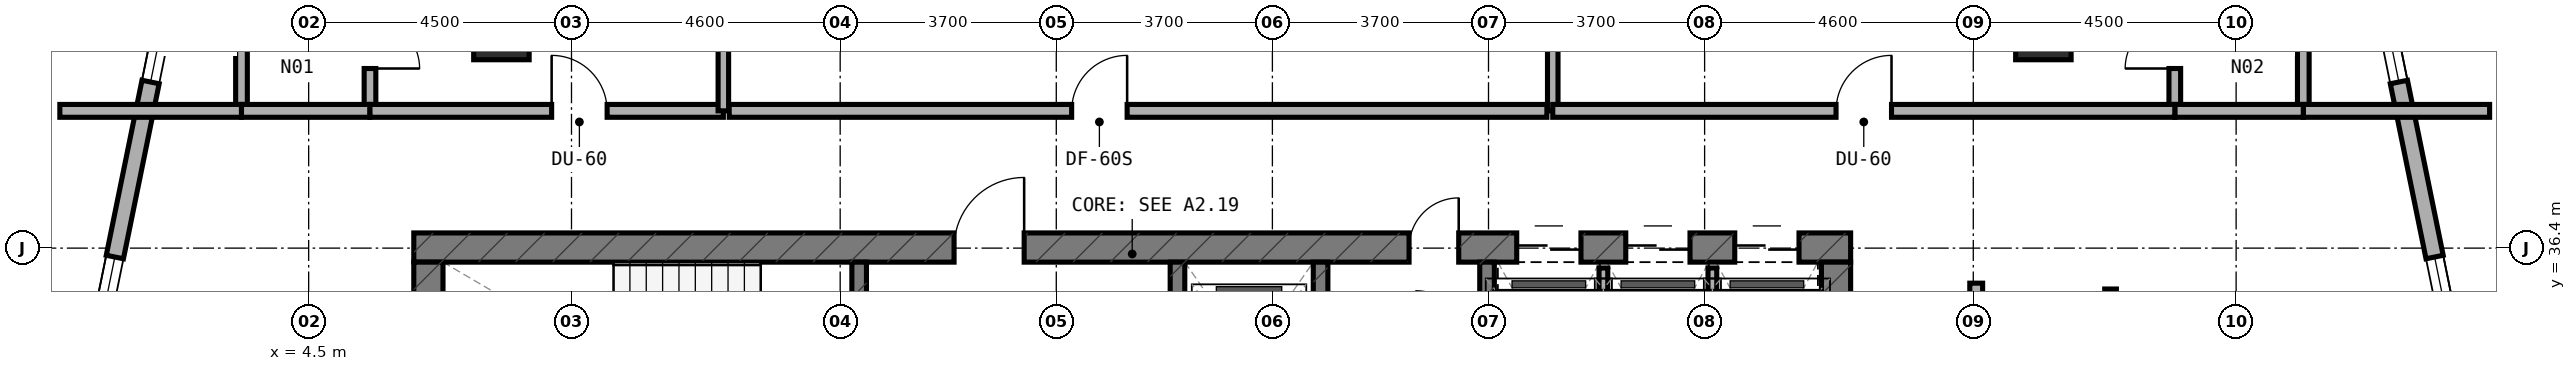
"""IFC4 building model, lengths in metres.
Left out: names, types, materials, properties, quantities, classifications, styles, units other than length and angle.
Written with IfcOpenShell. Run it as: python <this file> out.ifc"""

import sys

from ifc_helpers import new_model, si_unit, direction, frame, frame_2d, origin, origin_2d, place, context, subcontext, project, spatial, rectangle, extrude, element, fill, save


model = new_model("IFC4")
c1 = context("Model", 3, precision=1e-05, world=origin(), true_north=direction((0.0, 1.0)))
c2 = subcontext(c1, "Body", "Model", "MODEL_VIEW")
j1 = project(units=[si_unit("LENGTHUNIT", "METRE"), si_unit("PLANEANGLEUNIT", "RADIAN")], contexts=[c1])
p1 = place(None, origin())
s1 = spatial("IfcSite", under=j1, at=p1, CompositionType="ELEMENT")
p2 = place(p1, origin())
s2 = spatial("IfcBuilding", under=s1, at=p2, CompositionType="ELEMENT")
p3 = place(p2, frame((0.0, 0.0, 80.0)))
s3 = spatial("IfcBuildingStorey", under=s2, at=p3, CompositionType="ELEMENT", Elevation=80.0)
p4 = place(p3, frame((6.3, 36.41, 0.0), z_axis=(0.0, 0.0, 1.0), x_axis=(1.0, 0.0, 0.0)))
e1 = element("IfcWall", 1, at=p4, inside=s3, PredefinedType="SHEAR", context=c2, shape_type="SweptSolid", body=[
    extrude(rectangle(XDim=24.6, YDim=0.5, at=frame_2d((12.3, 0.0))), origin(), (0.0, 0.0, 1.0), 3.5),
])
p5 = place(p4, frame((9.25, 0.0, 0.0)))
e2 = element("IfcOpeningElement", 2, at=p5, cuts=e1, PredefinedType="OPENING", context=c2, shape_type="SweptSolid", body=[
    extrude(rectangle(XDim=1.2, YDim=2.15, at=frame_2d((0.6, 1.075))), frame((0.0, 0.26, 0.0), z_axis=(0.0, -1.0, 0.0), x_axis=(1.0, 0.0, 0.0)), (0.0, 0.0, 1.0), 0.52),
])
p6 = place(p4, frame((17.04, 0.0, 0.0)))
e3 = element("IfcOpeningElement", 3, at=p6, cuts=e1, PredefinedType="OPENING", context=c2, shape_type="SweptSolid", body=[
    extrude(rectangle(XDim=0.85, YDim=2.1, at=frame_2d((0.425, 1.05))), frame((0.0, 0.26, 0.0), z_axis=(0.0, -1.0, 0.0), x_axis=(1.0, 0.0, 0.0)), (0.0, 0.0, 1.0), 0.52),
])
p7 = place(p4, frame((18.883, 0.0, 0.0)))
e4 = element("IfcOpeningElement", 4, at=p7, cuts=e1, PredefinedType="OPENING", context=c2, shape_type="SweptSolid", body=[
    extrude(rectangle(XDim=1.1, YDim=2.15, at=frame_2d((0.55, 1.075))), frame((0.0, 0.26, 0.0), z_axis=(0.0, -1.0, 0.0), x_axis=(1.0, 0.0, 0.0)), (0.0, 0.0, 1.0), 0.52),
])
p8 = place(p4, frame((20.75, 0.0, 0.0)))
e5 = element("IfcOpeningElement", 5, at=p8, cuts=e1, PredefinedType="OPENING", context=c2, shape_type="SweptSolid", body=[
    extrude(rectangle(XDim=1.1, YDim=2.15, at=frame_2d((0.55, 1.075))), frame((0.0, 0.26, 0.0), z_axis=(0.0, -1.0, 0.0), x_axis=(1.0, 0.0, 0.0)), (0.0, 0.0, 1.0), 0.52),
])
p9 = place(p4, frame((22.616, 0.0, 0.0)))
e6 = element("IfcOpeningElement", 6, at=p9, cuts=e1, PredefinedType="OPENING", context=c2, shape_type="SweptSolid", body=[
    extrude(rectangle(XDim=1.1, YDim=2.15, at=frame_2d((0.55, 1.075))), frame((0.0, 0.26, 0.0), z_axis=(0.0, -1.0, 0.0), x_axis=(1.0, 0.0, 0.0)), (0.0, 0.0, 1.0), 0.52),
])
for number, where, z_axis, x_axis in (
    (7, (6.55, 33.0, 0.0), (0.0, 0.0, 1.0), (0.0, 1.0, 0.0)),
    (8, (30.65, 33.0, 0.0), (0.0, 0.0, 1.0), (0.0, 1.0, 0.0)),
):
    element("IfcWall", number, at=place(p3, frame(where, z_axis=z_axis, x_axis=x_axis)), inside=s3, PredefinedType="SHEAR", context=c2, shape_type="SweptSolid", body=[
        extrude(rectangle(XDim=3.16, YDim=0.5, at=frame_2d((1.58, 0.0))), origin(), (0.0, 0.0, 1.0), 3.5),
    ])
p10 = place(p3, frame((13.925, 33.0, 0.0), z_axis=(0.0, 0.0, 1.0), x_axis=(0.0, 1.0, 0.0)))
e9 = element("IfcWall", 9, at=p10, inside=s3, PredefinedType="STANDARD", context=c2, shape_type="SweptSolid", body=[
    extrude(rectangle(XDim=3.16, YDim=0.25, at=frame_2d((1.58, 0.0))), origin(), (0.0, 0.0, 1.0), 3.22),
])
p11 = place(p10, frame((0.98, 0.0, 0.0)))
e10 = element("IfcOpeningElement", 10, at=p11, cuts=e9, PredefinedType="OPENING", context=c2, shape_type="SweptSolid", body=[
    extrude(rectangle(XDim=1.1, YDim=2.15, at=frame_2d((0.55, 1.075))), frame((0.0, 0.135, 0.0), z_axis=(0.0, -1.0, 0.0), x_axis=(1.0, 0.0, 0.0)), (0.0, 0.0, 1.0), 0.27),
])
p12 = place(p3, frame((19.375, 33.0, 0.0), z_axis=(0.0, 0.0, 1.0), x_axis=(0.0, 1.0, 0.0)))
e11 = element("IfcWall", 11, at=p12, inside=s3, PredefinedType="STANDARD", context=c2, shape_type="SweptSolid", body=[
    extrude(rectangle(XDim=3.16, YDim=0.25, at=frame_2d((1.58, 0.0))), origin(), (0.0, 0.0, 1.0), 3.22),
])
p13 = place(p12, frame((0.98, 0.0, 0.0)))
e12 = element("IfcOpeningElement", 12, at=p13, cuts=e11, PredefinedType="OPENING", context=c2, shape_type="SweptSolid", body=[
    extrude(rectangle(XDim=1.1, YDim=2.15, at=frame_2d((0.55, 1.075))), frame((0.0, 0.135, 0.0), z_axis=(0.0, -1.0, 0.0), x_axis=(1.0, 0.0, 0.0)), (0.0, 0.0, 1.0), 0.27),
])
for number, where, z_axis, x_axis in (
    (13, (21.825, 33.0, 0.0), (0.0, 0.0, 1.0), (0.0, 1.0, 0.0)),
    (14, (24.675, 33.0, 0.0), (0.0, 0.0, 1.0), (0.0, 1.0, 0.0)),
):
    element("IfcWall", number, at=place(p3, frame(where, z_axis=z_axis, x_axis=x_axis)), inside=s3, PredefinedType="STANDARD", context=c2, shape_type="SweptSolid", body=[
        extrude(rectangle(XDim=3.16, YDim=0.25, at=frame_2d((1.58, 0.0))), origin(), (0.0, 0.0, 1.0), 3.22),
    ])
for number, where, z_axis, x_axis in (
    (15, (34.2, 40.2, 0.0), (0.0, 0.0, 1.0), (1.0, 0.0, 0.0)),
    (16, (7.8, 40.2, 0.0), (0.0, 0.0, 1.0), (1.0, 0.0, 0.0)),
):
    element("IfcColumn", number, at=place(p3, frame(where, z_axis=z_axis, x_axis=x_axis)), inside=s3, PredefinedType="COLUMN", context=c2, shape_type="SweptSolid", body=[
        extrude(rectangle(XDim=0.95, YDim=1.15, at=origin_2d()), origin(), (0.0, 0.0, 1.0), 3.5),
    ])
p14 = place(p3, frame((41.864, 31.516, 0.0), z_axis=(0.0, 0.0, 1.0), x_axis=(-0.199990901713, 0.979797754249, 0.0)))
e17 = element("IfcWall", 17, at=p14, inside=s3, PredefinedType="STANDARD", context=c2, shape_type="SweptSolid", body=[
    extrude(rectangle(XDim=10.065, YDim=0.3, at=frame_2d((5.033, 0.0))), origin(), (0.0, 0.0, 1.0), 3.22),
])
p15 = place(p14, frame((2.429, 0.0, 0.8)))
e18 = element("IfcOpeningElement", 18, at=p15, cuts=e17, PredefinedType="OPENING", context=c2, shape_type="SweptSolid", body=[
    extrude(rectangle(XDim=2.4, YDim=1.6, at=frame_2d((1.2, 0.8))), frame((0.0, 0.16, 0.0), z_axis=(0.0, -1.0, 0.0), x_axis=(1.0, 0.0, 0.0)), (0.0, 0.0, 1.0), 0.32),
])
p16 = place(p14, frame((7.887, 0.0, 0.85)))
e19 = element("IfcOpeningElement", 19, at=p16, cuts=e17, PredefinedType="OPENING", context=c2, shape_type="SweptSolid", body=[
    extrude(rectangle(XDim=1.8, YDim=1.5, at=frame_2d((0.9, 0.75))), frame((0.0, 0.16, 0.0), z_axis=(0.0, -1.0, 0.0), x_axis=(1.0, 0.0, 0.0)), (0.0, 0.0, 1.0), 0.32),
])
p17 = place(p3, frame((2.229, 41.378, 0.0), z_axis=(0.0, 0.0, 1.0), x_axis=(-0.199990901713, -0.979797754249, 0.0)))
e20 = element("IfcWall", 20, at=p17, inside=s3, PredefinedType="STANDARD", context=c2, shape_type="SweptSolid", body=[
    extrude(rectangle(XDim=10.065, YDim=0.3, at=frame_2d((5.033, 0.0))), origin(), (0.0, 0.0, 1.0), 3.22),
])
p18 = place(p17, frame((0.378, 0.0, 0.85)))
e21 = element("IfcOpeningElement", 21, at=p18, cuts=e20, PredefinedType="OPENING", context=c2, shape_type="SweptSolid", body=[
    extrude(rectangle(XDim=1.8, YDim=1.5, at=frame_2d((0.9, 0.75))), frame((0.0, 0.16, 0.0), z_axis=(0.0, -1.0, 0.0), x_axis=(1.0, 0.0, 0.0)), (0.0, 0.0, 1.0), 0.32),
])
p19 = place(p17, frame((5.236, 0.0, 0.8)))
e22 = element("IfcOpeningElement", 22, at=p19, cuts=e20, PredefinedType="OPENING", context=c2, shape_type="SweptSolid", body=[
    extrude(rectangle(XDim=2.4, YDim=1.6, at=frame_2d((1.2, 0.8))), frame((0.0, 0.16, 0.0), z_axis=(0.0, -1.0, 0.0), x_axis=(1.0, 0.0, 0.0)), (0.0, 0.0, 1.0), 0.32),
])
p20 = place(p3, frame((26.667, 33.1, 0.0), z_axis=(0.0, 0.0, 1.0), x_axis=(0.0, 1.0, 0.0)))
e23 = element("IfcWall", 23, at=p20, inside=s3, PredefinedType="PARTITIONING", context=c2, shape_type="SweptSolid", body=[
    extrude(rectangle(XDim=2.96, YDim=0.15, at=frame_2d((1.48, 0.0))), origin(), (0.0, 0.0, 1.0), 3.22),
])
p21 = place(p3, frame((28.533, 33.1, 0.0), z_axis=(0.0, 0.0, 1.0), x_axis=(0.0, 1.0, 0.0)))
e24 = element("IfcWall", 24, at=p21, inside=s3, PredefinedType="PARTITIONING", context=c2, shape_type="SweptSolid", body=[
    extrude(rectangle(XDim=2.96, YDim=0.15, at=frame_2d((1.48, 0.0))), origin(), (0.0, 0.0, 1.0), 2.495),
])
p22 = place(p3, frame((5.55, 38.85, 0.0), z_axis=(0.0, 0.0, 1.0), x_axis=(0.0, 1.0, 0.0)))
e25 = element("IfcWall", 25, at=p22, inside=s3, PredefinedType="PLUMBINGWALL", context=c2, shape_type="SweptSolid", body=[
    extrude(rectangle(XDim=2.1, YDim=0.2, at=frame_2d((1.05, 0.0))), origin(), (0.0, 0.0, 1.0), 3.22),
])
p23 = place(p22, frame((0.625, 0.0, 0.0)))
e26 = element("IfcOpeningElement", 26, at=p23, cuts=e25, PredefinedType="OPENING", context=c2, shape_type="SweptSolid", body=[
    extrude(rectangle(XDim=0.85, YDim=2.1, at=frame_2d((0.425, 1.05))), frame((0.0, 0.11, 0.0), z_axis=(0.0, -1.0, 0.0), x_axis=(1.0, 0.0, 0.0)), (0.0, 0.0, 1.0), 0.22),
])
p24 = place(p3, frame((3.35, 38.85, 0.0), z_axis=(0.0, 0.0, 1.0), x_axis=(0.0, 1.0, 0.0)))
e27 = element("IfcWall", 27, at=p24, inside=s3, PredefinedType="PLUMBINGWALL", context=c2, shape_type="SweptSolid", body=[
    extrude(rectangle(XDim=2.1, YDim=0.2, at=frame_2d((1.05, 0.0))), origin(), (0.0, 0.0, 1.0), 3.22),
])
p25 = place(p3, frame((0.24, 38.75, 0.0), z_axis=(0.0, 0.0, 1.0), x_axis=(1.0, 0.0, 0.0)))
e28 = element("IfcWall", 28, at=p25, inside=s3, PredefinedType="SOLIDWALL", context=c2, shape_type="SweptSolid", body=[
    extrude(rectangle(XDim=3.11, YDim=0.22, at=frame_2d((1.555, 0.0))), origin(), (0.0, 0.0, 1.0), 3.22),
])
p26 = place(p3, frame((3.35, 38.75, 0.0), z_axis=(0.0, 0.0, 1.0), x_axis=(1.0, 0.0, 0.0)))
e29 = element("IfcWall", 29, at=p26, inside=s3, PredefinedType="SOLIDWALL", context=c2, shape_type="SweptSolid", body=[
    extrude(rectangle(XDim=2.2, YDim=0.22, at=frame_2d((1.1, 0.0))), origin(), (0.0, 0.0, 1.0), 3.22),
])
p27 = place(p3, frame((5.55, 38.75, 0.0), z_axis=(0.0, 0.0, 1.0), x_axis=(1.0, 0.0, 0.0)))
e30 = element("IfcWall", 30, at=p27, inside=s3, PredefinedType="SOLIDWALL", context=c2, shape_type="SweptSolid", body=[
    extrude(rectangle(XDim=6.05, YDim=0.22, at=frame_2d((3.025, 0.0))), origin(), (0.0, 0.0, 1.0), 2.495),
])
p28 = place(p27, frame((3.11, 0.0, 0.0)))
e31 = element("IfcOpeningElement", 31, at=p28, cuts=e30, PredefinedType="OPENING", context=c2, shape_type="SweptSolid", body=[
    extrude(rectangle(XDim=0.95, YDim=2.1, at=frame_2d((0.475, 1.05))), frame((0.0, 0.12, 0.0), z_axis=(0.0, -1.0, 0.0), x_axis=(1.0, 0.0, 0.0)), (0.0, 0.0, 1.0), 0.24),
])
p29 = place(p3, frame((11.6, 38.75, 0.0), z_axis=(0.0, 0.0, 1.0), x_axis=(0.0, 1.0, 0.0)))
e32 = element("IfcWall", 32, at=p29, inside=s3, PredefinedType="SOLIDWALL", context=c2, shape_type="SweptSolid", body=[
    extrude(rectangle(XDim=7.494, YDim=0.18, at=frame_2d((3.747, 0.0))), origin(), (0.0, 0.0, 1.0), 2.745),
])
p30 = place(p3, frame((11.7, 38.75, 0.0), z_axis=(0.0, 0.0, 1.0), x_axis=(1.0, 0.0, 0.0)))
e33 = element("IfcWall", 33, at=p30, inside=s3, PredefinedType="SOLIDWALL", context=c2, shape_type="SweptSolid", body=[
    extrude(rectangle(XDim=14.0, YDim=0.22, at=frame_2d((7.0, 0.0))), origin(), (0.0, 0.0, 1.0), 2.495),
])
p31 = place(p30, frame((5.863, 0.0, 0.0)))
e34 = element("IfcOpeningElement", 34, at=p31, cuts=e33, PredefinedType="OPENING", context=c2, shape_type="SweptSolid", body=[
    extrude(rectangle(XDim=0.95, YDim=2.1, at=frame_2d((0.475, 1.05))), frame((0.0, 0.12, 0.0), z_axis=(0.0, -1.0, 0.0), x_axis=(1.0, 0.0, 0.0)), (0.0, 0.0, 1.0), 0.24),
])
p32 = place(p3, frame((25.8, 38.75, 0.0), z_axis=(0.0, 0.0, 1.0), x_axis=(0.0, 1.0, 0.0)))
e35 = element("IfcWall", 35, at=p32, inside=s3, PredefinedType="SOLIDWALL", context=c2, shape_type="SweptSolid", body=[
    extrude(rectangle(XDim=8.19, YDim=0.18, at=frame_2d((4.095, 0.0))), origin(), (0.0, 0.0, 1.0), 2.495),
])
p33 = place(p3, frame((36.45, 38.85, 0.0), z_axis=(0.0, 0.0, 1.0), x_axis=(0.0, 1.0, 0.0)))
e36 = element("IfcWall", 36, at=p33, inside=s3, PredefinedType="PLUMBINGWALL", context=c2, shape_type="SweptSolid", body=[
    extrude(rectangle(XDim=2.1, YDim=0.2, at=frame_2d((1.05, 0.0))), origin(), (0.0, 0.0, 1.0), 3.22),
])
p34 = place(p33, frame((0.625, 0.0, 0.0)))
e37 = element("IfcOpeningElement", 37, at=p34, cuts=e36, PredefinedType="OPENING", context=c2, shape_type="SweptSolid", body=[
    extrude(rectangle(XDim=0.85, YDim=2.1, at=frame_2d((0.425, 1.05))), frame((0.0, 0.11, 0.0), z_axis=(0.0, -1.0, 0.0), x_axis=(1.0, 0.0, 0.0)), (0.0, 0.0, 1.0), 0.22),
])
p35 = place(p3, frame((38.65, 38.85, 0.0), z_axis=(0.0, 0.0, 1.0), x_axis=(0.0, 1.0, 0.0)))
e38 = element("IfcWall", 38, at=p35, inside=s3, PredefinedType="PLUMBINGWALL", context=c2, shape_type="SweptSolid", body=[
    extrude(rectangle(XDim=2.1, YDim=0.2, at=frame_2d((1.05, 0.0))), origin(), (0.0, 0.0, 1.0), 3.22),
])
p36 = place(p3, frame((38.65, 38.75, 0.0), z_axis=(0.0, 0.0, 1.0), x_axis=(1.0, 0.0, 0.0)))
e39 = element("IfcWall", 39, at=p36, inside=s3, PredefinedType="SOLIDWALL", context=c2, shape_type="SweptSolid", body=[
    extrude(rectangle(XDim=3.19, YDim=0.22, at=frame_2d((1.595, 0.0))), origin(), (0.0, 0.0, 1.0), 3.22),
])
p37 = place(p3, frame((36.45, 38.75, 0.0), z_axis=(0.0, 0.0, 1.0), x_axis=(1.0, 0.0, 0.0)))
e40 = element("IfcWall", 40, at=p37, inside=s3, PredefinedType="SOLIDWALL", context=c2, shape_type="SweptSolid", body=[
    extrude(rectangle(XDim=2.2, YDim=0.22, at=frame_2d((1.1, 0.0))), origin(), (0.0, 0.0, 1.0), 3.22),
])
p38 = place(p3, frame((25.8, 38.75, 0.0), z_axis=(0.0, 0.0, 1.0), x_axis=(1.0, 0.0, 0.0)))
e41 = element("IfcWall", 41, at=p38, inside=s3, PredefinedType="SOLIDWALL", context=c2, shape_type="SweptSolid", body=[
    extrude(rectangle(XDim=10.65, YDim=0.22, at=frame_2d((5.325, 0.0))), origin(), (0.0, 0.0, 1.0), 2.495),
])
p39 = place(p38, frame((4.85, 0.0, 0.0)))
e42 = element("IfcOpeningElement", 42, at=p39, cuts=e41, PredefinedType="OPENING", context=c2, shape_type="SweptSolid", body=[
    extrude(rectangle(XDim=0.95, YDim=2.1, at=frame_2d((0.475, 1.05))), frame((0.0, 0.12, 0.0), z_axis=(0.0, -1.0, 0.0), x_axis=(1.0, 0.0, 0.0)), (0.0, 0.0, 1.0), 0.24),
])
p40 = place(p3, frame((35.35, 33.7, 0.0), z_axis=(0.0, 0.0, 1.0), x_axis=(0.0, 1.0, 0.0)))
e43 = element("IfcWall", 43, at=p40, inside=s3, PredefinedType="PLUMBINGWALL", context=c2, shape_type="SweptSolid", body=[
    extrude(rectangle(XDim=2.0, YDim=0.2, at=frame_2d((1.0, 0.0))), origin(), (0.0, 0.0, 1.0), 2.745),
])
p41 = place(p3, frame((33.05, 33.6, 0.0), z_axis=(0.0, 0.0, 1.0), x_axis=(0.0, 1.0, 0.0)))
e44 = element("IfcWall", 44, at=p41, inside=s3, PredefinedType="SOLIDWALL", context=c2, shape_type="SweptSolid", body=[
    extrude(rectangle(XDim=2.2, YDim=0.22, at=frame_2d((1.1, 0.0))), origin(), (0.0, 0.0, 1.0), 3.22),
])
p42 = place(p15, origin())
e45 = element("IfcWindow", 45, at=p42, inside=s3, PartitioningType="SINGLE_PANEL", PredefinedType="WINDOW", context=c2, shape_type="SweptSolid", body=[
    extrude(rectangle(XDim=2.4, YDim=1.6, at=frame_2d((1.2, 0.8))), frame((0.0, 0.03, 0.0), z_axis=(0.0, -1.0, 0.0), x_axis=(1.0, 0.0, 0.0)), (0.0, 0.0, 1.0), 0.06),
])
fill(e18, e45)
p43 = place(p16, origin())
e46 = element("IfcWindow", 46, at=p43, inside=s3, PartitioningType="SINGLE_PANEL", PredefinedType="WINDOW", context=c2, shape_type="SweptSolid", body=[
    extrude(rectangle(XDim=1.8, YDim=1.5, at=frame_2d((0.9, 0.75))), frame((0.0, 0.03, 0.0), z_axis=(0.0, -1.0, 0.0), x_axis=(1.0, 0.0, 0.0)), (0.0, 0.0, 1.0), 0.06),
])
fill(e19, e46)
p44 = place(p18, origin())
e47 = element("IfcWindow", 47, at=p44, inside=s3, PartitioningType="SINGLE_PANEL", PredefinedType="WINDOW", context=c2, shape_type="SweptSolid", body=[
    extrude(rectangle(XDim=1.8, YDim=1.5, at=frame_2d((0.9, 0.75))), frame((0.0, 0.03, 0.0), z_axis=(0.0, -1.0, 0.0), x_axis=(1.0, 0.0, 0.0)), (0.0, 0.0, 1.0), 0.06),
])
fill(e21, e47)
p45 = place(p19, origin())
e48 = element("IfcWindow", 48, at=p45, inside=s3, PartitioningType="SINGLE_PANEL", PredefinedType="WINDOW", context=c2, shape_type="SweptSolid", body=[
    extrude(rectangle(XDim=2.4, YDim=1.6, at=frame_2d((1.2, 0.8))), frame((0.0, 0.03, 0.0), z_axis=(0.0, -1.0, 0.0), x_axis=(1.0, 0.0, 0.0)), (0.0, 0.0, 1.0), 0.06),
])
fill(e22, e48)
p46 = place(p5, origin())
e49 = element("IfcDoor", 49, at=p46, inside=s3, OperationType="SINGLE_SWING_RIGHT", PredefinedType="DOOR", context=c2, shape_type="SweptSolid", body=[
    extrude(rectangle(XDim=1.2, YDim=2.15, at=frame_2d((0.6, 1.075))), frame((0.0, 0.025, 0.0), z_axis=(0.0, -1.0, 0.0), x_axis=(1.0, 0.0, 0.0)), (0.0, 0.0, 1.0), 0.05),
])
fill(e2, e49)
p47 = place(p6, origin())
e50 = element("IfcDoor", 50, at=p47, inside=s3, OperationType="SINGLE_SWING_RIGHT", PredefinedType="DOOR", context=c2, shape_type="SweptSolid", body=[
    extrude(rectangle(XDim=0.85, YDim=2.1, at=frame_2d((0.425, 1.05))), frame((0.0, 0.025, 0.0), z_axis=(0.0, -1.0, 0.0), x_axis=(1.0, 0.0, 0.0)), (0.0, 0.0, 1.0), 0.05),
])
fill(e3, e50)
p48 = place(p7, origin())
e51 = element("IfcDoor", 51, at=p48, inside=s3, OperationType="DOUBLE_DOOR_SLIDING", PredefinedType="DOOR", context=c2, shape_type="SweptSolid", body=[
    extrude(rectangle(XDim=1.1, YDim=2.15, at=frame_2d((0.55, 1.075))), frame((0.0, 0.025, 0.0), z_axis=(0.0, -1.0, 0.0), x_axis=(1.0, 0.0, 0.0)), (0.0, 0.0, 1.0), 0.05),
])
fill(e4, e51)
p49 = place(p8, origin())
e52 = element("IfcDoor", 52, at=p49, inside=s3, OperationType="DOUBLE_DOOR_SLIDING", PredefinedType="DOOR", context=c2, shape_type="SweptSolid", body=[
    extrude(rectangle(XDim=1.1, YDim=2.15, at=frame_2d((0.55, 1.075))), frame((0.0, 0.025, 0.0), z_axis=(0.0, -1.0, 0.0), x_axis=(1.0, 0.0, 0.0)), (0.0, 0.0, 1.0), 0.05),
])
fill(e5, e52)
p50 = place(p9, origin())
e53 = element("IfcDoor", 53, at=p50, inside=s3, OperationType="DOUBLE_DOOR_SLIDING", PredefinedType="DOOR", context=c2, shape_type="SweptSolid", body=[
    extrude(rectangle(XDim=1.1, YDim=2.15, at=frame_2d((0.55, 1.075))), frame((0.0, 0.025, 0.0), z_axis=(0.0, -1.0, 0.0), x_axis=(1.0, 0.0, 0.0)), (0.0, 0.0, 1.0), 0.05),
])
fill(e6, e53)
p51 = place(p23, frame((0.85, 0.0, 0.0), z_axis=(0.0, 0.0, 1.0), x_axis=(-1.0, 0.0, 0.0)))
e54 = element("IfcDoor", 54, at=p51, inside=s3, OperationType="SINGLE_SWING_RIGHT", PredefinedType="DOOR", context=c2, shape_type="SweptSolid", body=[
    extrude(rectangle(XDim=0.85, YDim=2.1, at=frame_2d((0.425, 1.05))), frame((0.0, 0.025, 0.0), z_axis=(0.0, -1.0, 0.0), x_axis=(1.0, 0.0, 0.0)), (0.0, 0.0, 1.0), 0.05),
])
fill(e26, e54)
p52 = place(p28, origin())
e55 = element("IfcDoor", 55, at=p52, inside=s3, OperationType="SINGLE_SWING_LEFT", PredefinedType="DOOR", context=c2, shape_type="SweptSolid", body=[
    extrude(rectangle(XDim=0.95, YDim=2.1, at=frame_2d((0.475, 1.05))), frame((0.0, 0.025, 0.0), z_axis=(0.0, -1.0, 0.0), x_axis=(1.0, 0.0, 0.0)), (0.0, 0.0, 1.0), 0.05),
])
fill(e31, e55)
p53 = place(p31, origin())
e56 = element("IfcDoor", 56, at=p53, inside=s3, OperationType="SINGLE_SWING_RIGHT", PredefinedType="DOOR", context=c2, shape_type="SweptSolid", body=[
    extrude(rectangle(XDim=0.95, YDim=2.1, at=frame_2d((0.475, 1.05))), frame((0.0, 0.025, 0.0), z_axis=(0.0, -1.0, 0.0), x_axis=(1.0, 0.0, 0.0)), (0.0, 0.0, 1.0), 0.05),
])
fill(e34, e56)
p54 = place(p34, origin())
e57 = element("IfcDoor", 57, at=p54, inside=s3, OperationType="SINGLE_SWING_LEFT", PredefinedType="DOOR", context=c2, shape_type="SweptSolid", body=[
    extrude(rectangle(XDim=0.85, YDim=2.1, at=frame_2d((0.425, 1.05))), frame((0.0, 0.025, 0.0), z_axis=(0.0, -1.0, 0.0), x_axis=(1.0, 0.0, 0.0)), (0.0, 0.0, 1.0), 0.05),
])
fill(e37, e57)
p55 = place(p39, origin())
e58 = element("IfcDoor", 58, at=p55, inside=s3, OperationType="SINGLE_SWING_RIGHT", PredefinedType="DOOR", context=c2, shape_type="SweptSolid", body=[
    extrude(rectangle(XDim=0.95, YDim=2.1, at=frame_2d((0.475, 1.05))), frame((0.0, 0.025, 0.0), z_axis=(0.0, -1.0, 0.0), x_axis=(1.0, 0.0, 0.0)), (0.0, 0.0, 1.0), 0.05),
])
fill(e42, e58)
save(model, sys.argv[1])
